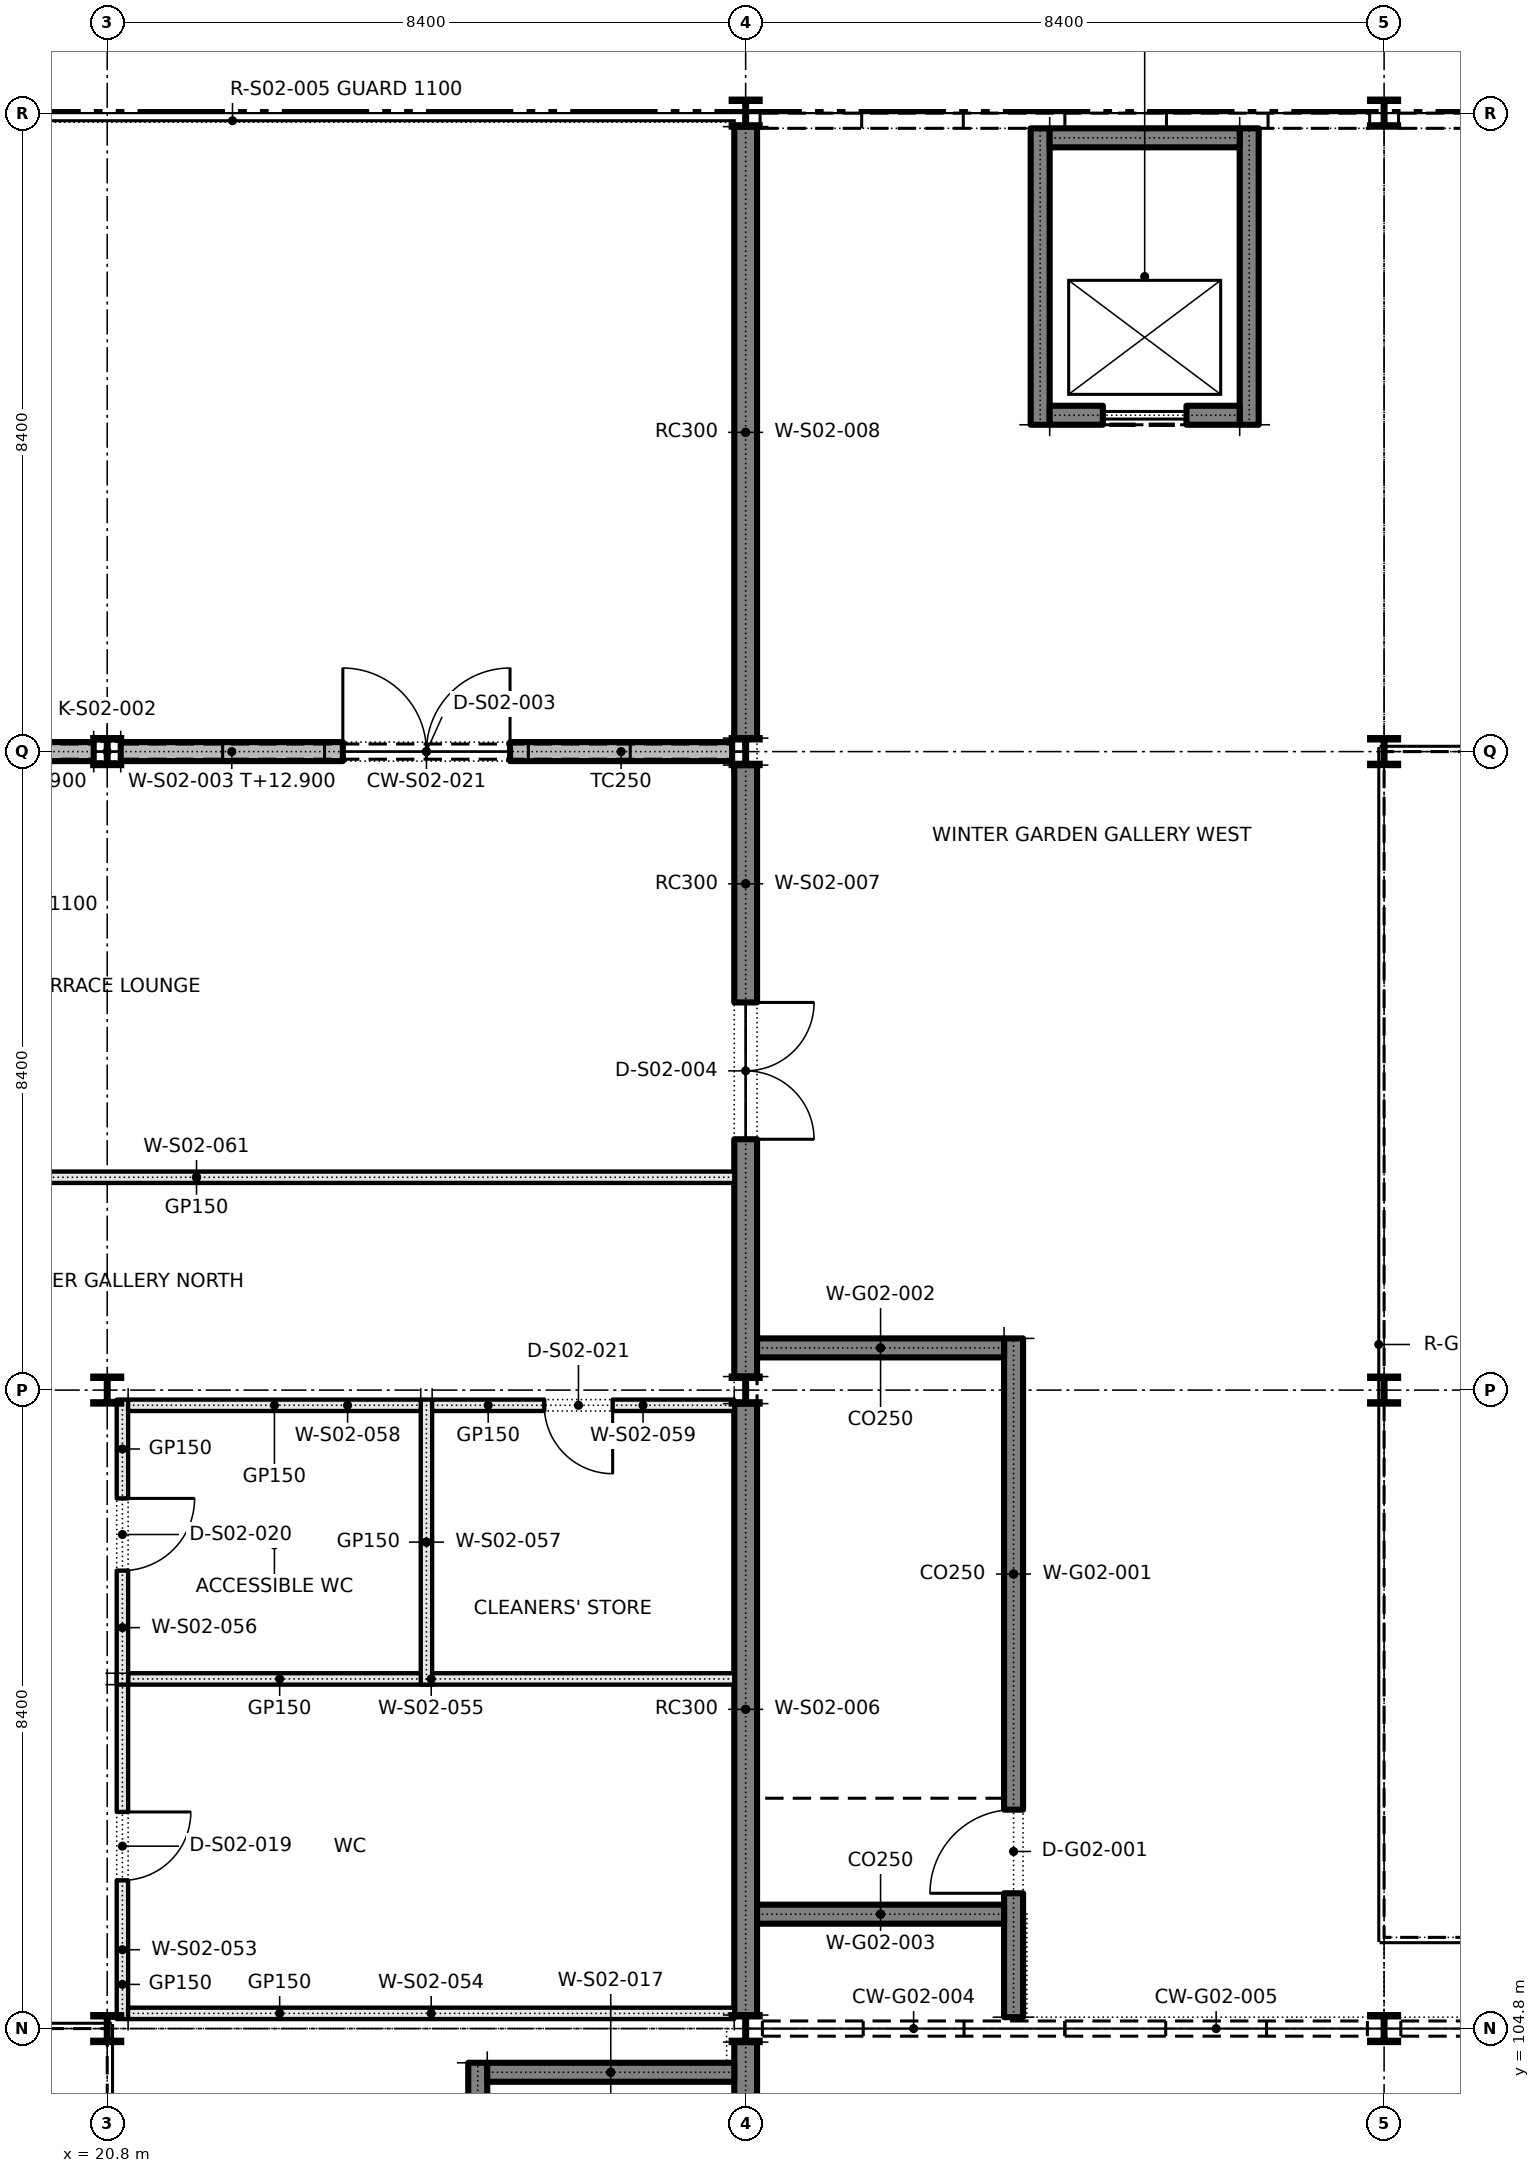
"""IFC4 building model, lengths in metres.
Left out: names, types, materials, properties, quantities, classifications, styles, units other than length and angle.
Written with IfcOpenShell. Run it as: python <this file> out.ifc"""

import sys

from ifc_helpers import new_model, si_unit, direction, frame, frame_2d, origin, origin_2d, place, context, subcontext, project, spatial, rectangle, i_section, extrude, element, fill, save


model = new_model("IFC4")
c1 = context("Model", 3, precision=1e-05, world=origin(), true_north=direction((0.0, 1.0)))
c2 = subcontext(c1, "Body", "Model", "MODEL_VIEW")
j1 = project(units=[si_unit("LENGTHUNIT", "METRE"), si_unit("PLANEANGLEUNIT", "RADIAN")], contexts=[c1])
p1 = place(None, origin())
s1 = spatial("IfcSite", under=j1, at=p1, CompositionType="ELEMENT")
p2 = place(p1, origin())
s2 = spatial("IfcBuilding", under=s1, at=p2, CompositionType="ELEMENT")
p3 = place(p2, frame((0.0, 0.0, 10.2)))
s3 = spatial("IfcBuildingStorey", under=s2, at=p3, CompositionType="ELEMENT", Elevation=10.2)
for number, where, z_axis, x_axis in (
    (1, (20.8, 104.8, 0.0), (0.0, 0.0, 1.0), (1.0, 0.0, 0.0)),
    (2, (20.8, 113.2, 0.0), (0.0, 0.0, 1.0), (1.0, 0.0, 0.0)),
    (3, (20.8, 121.6, 0.0), (0.0, 0.0, 1.0), (1.0, 0.0, 0.0)),
    (4, (29.2, 104.8, 0.0), (0.0, 0.0, 1.0), (1.0, 0.0, 0.0)),
    (5, (29.2, 113.2, 0.0), (0.0, 0.0, 1.0), (1.0, 0.0, 0.0)),
    (6, (29.2, 121.6, 0.0), (0.0, 0.0, 1.0), (1.0, 0.0, 0.0)),
    (7, (29.2, 130.0, 0.0), (0.0, 0.0, 1.0), (1.0, 0.0, 0.0)),
    (8, (37.6, 104.8, 0.0), (0.0, 0.0, 1.0), (1.0, 0.0, 0.0)),
    (9, (37.6, 113.2, 0.0), (0.0, 0.0, 1.0), (1.0, 0.0, 0.0)),
    (10, (37.6, 121.6, 0.0), (0.0, 0.0, 1.0), (1.0, 0.0, 0.0)),
    (11, (37.6, 130.0, 0.0), (0.0, 0.0, 1.0), (1.0, 0.0, 0.0)),
):
    element("IfcColumn", number, at=place(p3, frame(where, z_axis=z_axis, x_axis=x_axis)), inside=s3, PredefinedType="COLUMN", context=c2, shape_type="SweptSolid", body=[
        extrude(i_section(OverallWidth=0.368, OverallDepth=0.356, WebThickness=0.011, FlangeThickness=0.018, FilletRadius=0.015, at=origin_2d()), origin(), (0.0, 0.0, 1.0), 4.8),
    ])
p4 = place(p3, frame((12.578, 121.6, 0.0), z_axis=(0.0, 0.0, 1.0), x_axis=(1.0, 0.0, 0.0)))
e12 = element("IfcWall", 12, at=p4, inside=s3, PredefinedType="SOLIDWALL", context=c2, shape_type="SweptSolid", body=[
    extrude(rectangle(XDim=8.044, YDim=0.25, at=frame_2d((4.022, 0.0))), origin(), (0.0, 0.0, 1.0), 2.7),
])
p5 = place(p4, frame((2.922, 0.0, 0.0)))
e13 = element("IfcOpeningElement", 13, at=p5, cuts=e12, PredefinedType="OPENING", context=c2, shape_type="SweptSolid", body=[
    extrude(rectangle(XDim=2.2, YDim=2.4, at=frame_2d((1.1, 1.2))), frame((0.0, 0.135, 0.0), z_axis=(0.0, -1.0, 0.0), x_axis=(1.0, 0.0, 0.0)), (0.0, 0.0, 1.0), 0.27),
])
p6 = place(p3, frame((20.978, 121.6, 0.0), z_axis=(0.0, 0.0, 1.0), x_axis=(1.0, 0.0, 0.0)))
e14 = element("IfcWall", 14, at=p6, inside=s3, PredefinedType="SOLIDWALL", context=c2, shape_type="SweptSolid", body=[
    extrude(rectangle(XDim=8.044, YDim=0.25, at=frame_2d((4.022, 0.0))), origin(), (0.0, 0.0, 1.0), 2.7),
])
p7 = place(p6, frame((2.922, 0.0, 0.0)))
e15 = element("IfcOpeningElement", 15, at=p7, cuts=e14, PredefinedType="OPENING", context=c2, shape_type="SweptSolid", body=[
    extrude(rectangle(XDim=2.2, YDim=2.4, at=frame_2d((1.1, 1.2))), frame((0.0, 0.135, 0.0), z_axis=(0.0, -1.0, 0.0), x_axis=(1.0, 0.0, 0.0)), (0.0, 0.0, 1.0), 0.27),
])
p8 = place(p3, frame((29.2, 96.65, 0.0), z_axis=(0.0, 0.0, 1.0), x_axis=(0.0, 1.0, 0.0)))
e16 = element("IfcWall", 16, at=p8, inside=s3, PredefinedType="SOLIDWALL", context=c2, shape_type="SweptSolid", body=[
    extrude(rectangle(XDim=7.972, YDim=0.3, at=frame_2d((3.986, 0.0))), origin(), (0.0, 0.0, 1.0), 4.8),
])
p9 = place(p3, frame((29.2, 104.978, 0.0), z_axis=(0.0, 0.0, 1.0), x_axis=(0.0, 1.0, 0.0)))
e17 = element("IfcWall", 17, at=p9, inside=s3, PredefinedType="SOLIDWALL", context=c2, shape_type="SweptSolid", body=[
    extrude(rectangle(XDim=8.044, YDim=0.3, at=frame_2d((4.022, 0.0))), origin(), (0.0, 0.0, 1.0), 4.8),
])
p10 = place(p3, frame((29.2, 113.378, 0.0), z_axis=(0.0, 0.0, 1.0), x_axis=(0.0, 1.0, 0.0)))
e18 = element("IfcWall", 18, at=p10, inside=s3, PredefinedType="SOLIDWALL", context=c2, shape_type="SweptSolid", body=[
    extrude(rectangle(XDim=8.044, YDim=0.3, at=frame_2d((4.022, 0.0))), origin(), (0.0, 0.0, 1.0), 4.8),
])
p11 = place(p10, frame((3.122, 0.0, 0.0)))
e19 = element("IfcOpeningElement", 19, at=p11, cuts=e18, PredefinedType="OPENING", context=c2, shape_type="SweptSolid", body=[
    extrude(rectangle(XDim=1.8, YDim=2.4, at=frame_2d((0.9, 1.2))), frame((0.0, 0.16, 0.0), z_axis=(0.0, -1.0, 0.0), x_axis=(1.0, 0.0, 0.0)), (0.0, 0.0, 1.0), 0.32),
])
p12 = place(p3, frame((29.2, 121.778, 0.0), z_axis=(0.0, 0.0, 1.0), x_axis=(0.0, 1.0, 0.0)))
e20 = element("IfcWall", 20, at=p12, inside=s3, PredefinedType="SOLIDWALL", context=c2, shape_type="SweptSolid", body=[
    extrude(rectangle(XDim=8.044, YDim=0.3, at=frame_2d((4.022, 0.0))), origin(), (0.0, 0.0, 1.0), 4.8),
])
p13 = place(p3, frame((25.675, 96.65, 0.0), z_axis=(0.0, 0.0, 1.0), x_axis=(0.0, 1.0, 0.0)))
e21 = element("IfcWall", 21, at=p13, inside=s3, PredefinedType="SHEAR", context=c2, shape_type="SweptSolid", body=[
    extrude(rectangle(XDim=7.7, YDim=0.25, at=frame_2d((3.85, 0.0))), origin(), (0.0, 0.0, 1.0), 4.8),
])
p14 = place(p13, frame((0.4, 0.0, 0.0)))
e22 = element("IfcOpeningElement", 22, at=p14, cuts=e21, PredefinedType="OPENING", context=c2, shape_type="SweptSolid", body=[
    extrude(rectangle(XDim=1.1, YDim=2.1, at=frame_2d((0.55, 1.05))), frame((0.0, 0.135, 0.0), z_axis=(0.0, -1.0, 0.0), x_axis=(1.0, 0.0, 0.0)), (0.0, 0.0, 1.0), 0.27),
])
p15 = place(p3, frame((25.8, 104.225, 0.0), z_axis=(0.0, 0.0, 1.0), x_axis=(1.0, 0.0, 0.0)))
e23 = element("IfcWall", 23, at=p15, inside=s3, PredefinedType="SHEAR", context=c2, shape_type="SweptSolid", body=[
    extrude(rectangle(XDim=3.25, YDim=0.25, at=frame_2d((1.625, 0.0))), origin(), (0.0, 0.0, 1.0), 4.8),
])
p16 = place(p3, frame((21.0, 104.925, 0.0), z_axis=(0.0, 0.0, 1.0), x_axis=(0.0, 1.0, 0.0)))
e24 = element("IfcWall", 24, at=p16, inside=s3, PredefinedType="PARTITIONING", context=c2, shape_type="SweptSolid", body=[
    extrude(rectangle(XDim=4.55, YDim=0.15, at=frame_2d((2.275, 0.0))), origin(), (0.0, 0.0, 1.0), 4.8),
])
p17 = place(p16, frame((1.825, 0.0, 0.0)))
e25 = element("IfcOpeningElement", 25, at=p17, cuts=e24, PredefinedType="OPENING", context=c2, shape_type="SweptSolid", body=[
    extrude(rectangle(XDim=0.9, YDim=2.1, at=frame_2d((0.45, 1.05))), frame((0.0, 0.085, 0.0), z_axis=(0.0, -1.0, 0.0), x_axis=(1.0, 0.0, 0.0)), (0.0, 0.0, 1.0), 0.17),
])
for number, where, z_axis, x_axis in (
    (26, (21.075, 105.0, 0.0), (0.0, 0.0, 1.0), (1.0, 0.0, 0.0)),
    (27, (21.075, 109.4, 0.0), (0.0, 0.0, 1.0), (1.0, 0.0, 0.0)),
):
    element("IfcWall", number, at=place(p3, frame(where, z_axis=z_axis, x_axis=x_axis)), inside=s3, PredefinedType="PARTITIONING", context=c2, shape_type="SweptSolid", body=[
        extrude(rectangle(XDim=7.975, YDim=0.15, at=frame_2d((3.988, 0.0))), origin(), (0.0, 0.0, 1.0), 4.8),
    ])
p18 = place(p3, frame((21.0, 109.325, 0.0), z_axis=(0.0, 0.0, 1.0), x_axis=(0.0, 1.0, 0.0)))
e28 = element("IfcWall", 28, at=p18, inside=s3, PredefinedType="PARTITIONING", context=c2, shape_type="SweptSolid", body=[
    extrude(rectangle(XDim=3.75, YDim=0.15, at=frame_2d((1.875, 0.0))), origin(), (0.0, 0.0, 1.0), 4.8),
])
p19 = place(p18, frame((1.5, 0.0, 0.0)))
e29 = element("IfcOpeningElement", 29, at=p19, cuts=e28, PredefinedType="OPENING", context=c2, shape_type="SweptSolid", body=[
    extrude(rectangle(XDim=0.95, YDim=2.1, at=frame_2d((0.475, 1.05))), frame((0.0, 0.085, 0.0), z_axis=(0.0, -1.0, 0.0), x_axis=(1.0, 0.0, 0.0)), (0.0, 0.0, 1.0), 0.17),
])
p20 = place(p3, frame((25.0, 109.325, 0.0), z_axis=(0.0, 0.0, 1.0), x_axis=(0.0, 1.0, 0.0)))
e30 = element("IfcWall", 30, at=p20, inside=s3, PredefinedType="PARTITIONING", context=c2, shape_type="SweptSolid", body=[
    extrude(rectangle(XDim=3.75, YDim=0.15, at=frame_2d((1.875, 0.0))), origin(), (0.0, 0.0, 1.0), 4.8),
])
p21 = place(p3, frame((21.075, 113.0, 0.0), z_axis=(0.0, 0.0, 1.0), x_axis=(1.0, 0.0, 0.0)))
e31 = element("IfcWall", 31, at=p21, inside=s3, PredefinedType="PARTITIONING", context=c2, shape_type="SweptSolid", body=[
    extrude(rectangle(XDim=3.85, YDim=0.15, at=frame_2d((1.925, 0.0))), origin(), (0.0, 0.0, 1.0), 4.8),
])
p22 = place(p3, frame((25.075, 113.0, 0.0), z_axis=(0.0, 0.0, 1.0), x_axis=(1.0, 0.0, 0.0)))
e32 = element("IfcWall", 32, at=p22, inside=s3, PredefinedType="PARTITIONING", context=c2, shape_type="SweptSolid", body=[
    extrude(rectangle(XDim=3.975, YDim=0.15, at=frame_2d((1.988, 0.0))), origin(), (0.0, 0.0, 1.0), 4.8),
])
p23 = place(p22, frame((1.475, 0.0, 0.0)))
e33 = element("IfcOpeningElement", 33, at=p23, cuts=e32, PredefinedType="OPENING", context=c2, shape_type="SweptSolid", body=[
    extrude(rectangle(XDim=0.9, YDim=2.1, at=frame_2d((0.45, 1.05))), frame((0.0, 0.085, 0.0), z_axis=(0.0, -1.0, 0.0), x_axis=(1.0, 0.0, 0.0)), (0.0, 0.0, 1.0), 0.17),
])
p24 = place(p3, frame((9.775, 116.0, 0.0), z_axis=(0.0, 0.0, 1.0), x_axis=(1.0, 0.0, 0.0)))
e34 = element("IfcWall", 34, at=p24, inside=s3, PredefinedType="PARTITIONING", context=c2, shape_type="SweptSolid", body=[
    extrude(rectangle(XDim=19.275, YDim=0.15, at=frame_2d((9.638, 0.0))), origin(), (0.0, 0.0, 1.0), 4.8),
])
p25 = place(p24, frame((3.325, 0.0, 0.0)))
e35 = element("IfcOpeningElement", 35, at=p25, cuts=e34, PredefinedType="OPENING", context=c2, shape_type="SweptSolid", body=[
    extrude(rectangle(XDim=1.8, YDim=2.1, at=frame_2d((0.9, 1.05))), frame((0.0, 0.085, 0.0), z_axis=(0.0, -1.0, 0.0), x_axis=(1.0, 0.0, 0.0)), (0.0, 0.0, 1.0), 0.17),
])
p26 = place(p3, frame((32.725, 104.95, 0.0), z_axis=(0.0, 0.0, 1.0), x_axis=(0.0, 1.0, 0.0)))
e36 = element("IfcWall", 36, at=p26, inside=s3, PredefinedType="SHEAR", context=c2, shape_type="SweptSolid", body=[
    extrude(rectangle(XDim=8.93, YDim=0.25, at=frame_2d((4.465, 0.0))), origin(), (0.0, 0.0, 1.0), 4.8),
])
p27 = place(p26, frame((1.63, 0.0, 0.0)))
e37 = element("IfcOpeningElement", 37, at=p27, cuts=e36, PredefinedType="OPENING", context=c2, shape_type="SweptSolid", body=[
    extrude(rectangle(XDim=1.1, YDim=2.1, at=frame_2d((0.55, 1.05))), frame((0.0, 0.135, 0.0), z_axis=(0.0, -1.0, 0.0), x_axis=(1.0, 0.0, 0.0)), (0.0, 0.0, 1.0), 0.27),
])
for number, where, z_axis, x_axis in (
    (38, (29.35, 113.755, 0.0), (0.0, 0.0, 1.0), (1.0, 0.0, 0.0)),
    (39, (29.35, 106.305, 0.0), (0.0, 0.0, 1.0), (1.0, 0.0, 0.0)),
):
    element("IfcWall", number, at=place(p3, frame(where, z_axis=z_axis, x_axis=x_axis)), inside=s3, PredefinedType="SHEAR", context=c2, shape_type="SweptSolid", body=[
        extrude(rectangle(XDim=3.25, YDim=0.25, at=frame_2d((1.625, 0.0))), origin(), (0.0, 0.0, 1.0), 4.8),
    ])
for number, where, z_axis, x_axis in (
    (40, (33.075, 125.9, 0.0), (0.0, 0.0, 1.0), (0.0, 1.0, 0.0)),
    (41, (35.825, 125.9, 0.0), (0.0, 0.0, 1.0), (0.0, 1.0, 0.0)),
):
    element("IfcWall", number, at=place(p3, frame(where, z_axis=z_axis, x_axis=x_axis)), inside=s3, PredefinedType="SOLIDWALL", context=c2, shape_type="SweptSolid", body=[
        extrude(rectangle(XDim=3.9, YDim=0.25, at=frame_2d((1.95, 0.0))), origin(), (0.0, 0.0, 1.0), 3.9),
    ])
p28 = place(p3, frame((33.2, 126.025, 0.0), z_axis=(0.0, 0.0, 1.0), x_axis=(1.0, 0.0, 0.0)))
e42 = element("IfcWall", 42, at=p28, inside=s3, PredefinedType="SOLIDWALL", context=c2, shape_type="SweptSolid", body=[
    extrude(rectangle(XDim=2.5, YDim=0.25, at=frame_2d((1.25, 0.0))), origin(), (0.0, 0.0, 1.0), 3.9),
])
p29 = place(p28, frame((0.7, 0.0, 0.0)))
e43 = element("IfcOpeningElement", 43, at=p29, cuts=e42, PredefinedType="OPENING", context=c2, shape_type="SweptSolid", body=[
    extrude(rectangle(XDim=1.1, YDim=2.1, at=frame_2d((0.55, 1.05))), frame((0.0, 0.135, 0.0), z_axis=(0.0, -1.0, 0.0), x_axis=(1.0, 0.0, 0.0)), (0.0, 0.0, 1.0), 0.27),
])
p30 = place(p3, frame((33.2, 129.675, 0.0), z_axis=(0.0, 0.0, 1.0), x_axis=(1.0, 0.0, 0.0)))
e44 = element("IfcWall", 44, at=p30, inside=s3, PredefinedType="SOLIDWALL", context=c2, shape_type="SweptSolid", body=[
    extrude(rectangle(XDim=2.5, YDim=0.25, at=frame_2d((1.25, 0.0))), origin(), (0.0, 0.0, 1.0), 3.9),
])
p31 = place(p7, origin())
e45 = element("IfcDoor", 45, at=p31, inside=s3, OperationType="DOUBLE_DOOR_SINGLE_SWING", PredefinedType="DOOR", context=c2, shape_type="SweptSolid", body=[
    extrude(rectangle(XDim=2.2, YDim=2.4, at=frame_2d((1.1, 1.2))), frame((0.0, 0.025, 0.0), z_axis=(0.0, -1.0, 0.0), x_axis=(1.0, 0.0, 0.0)), (0.0, 0.0, 1.0), 0.05),
])
fill(e15, e45)
p32 = place(p11, frame((1.8, 0.0, 0.0), z_axis=(0.0, 0.0, 1.0), x_axis=(-1.0, 0.0, 0.0)))
e46 = element("IfcDoor", 46, at=p32, inside=s3, OperationType="DOUBLE_DOOR_SINGLE_SWING", PredefinedType="DOOR", context=c2, shape_type="SweptSolid", body=[
    extrude(rectangle(XDim=1.8, YDim=2.4, at=frame_2d((0.9, 1.2))), frame((0.0, 0.025, 0.0), z_axis=(0.0, -1.0, 0.0), x_axis=(1.0, 0.0, 0.0)), (0.0, 0.0, 1.0), 0.05),
])
fill(e19, e46)
p33 = place(p17, frame((0.9, 0.0, 0.0), z_axis=(0.0, 0.0, 1.0), x_axis=(-1.0, 0.0, 0.0)))
e47 = element("IfcDoor", 47, at=p33, inside=s3, OperationType="SINGLE_SWING_LEFT", PredefinedType="DOOR", context=c2, shape_type="SweptSolid", body=[
    extrude(rectangle(XDim=0.9, YDim=2.1, at=frame_2d((0.45, 1.05))), frame((0.0, 0.025, 0.0), z_axis=(0.0, -1.0, 0.0), x_axis=(1.0, 0.0, 0.0)), (0.0, 0.0, 1.0), 0.05),
])
fill(e25, e47)
p34 = place(p19, frame((0.95, 0.0, 0.0), z_axis=(0.0, 0.0, 1.0), x_axis=(-1.0, 0.0, 0.0)))
e48 = element("IfcDoor", 48, at=p34, inside=s3, OperationType="SINGLE_SWING_LEFT", PredefinedType="DOOR", context=c2, shape_type="SweptSolid", body=[
    extrude(rectangle(XDim=0.95, YDim=2.1, at=frame_2d((0.475, 1.05))), frame((0.0, 0.025, 0.0), z_axis=(0.0, -1.0, 0.0), x_axis=(1.0, 0.0, 0.0)), (0.0, 0.0, 1.0), 0.05),
])
fill(e29, e48)
p35 = place(p23, frame((0.9, 0.0, 0.0), z_axis=(0.0, 0.0, 1.0), x_axis=(-1.0, 0.0, 0.0)))
e49 = element("IfcDoor", 49, at=p35, inside=s3, OperationType="SINGLE_SWING_LEFT", PredefinedType="DOOR", context=c2, shape_type="SweptSolid", body=[
    extrude(rectangle(XDim=0.9, YDim=2.1, at=frame_2d((0.45, 1.05))), frame((0.0, 0.025, 0.0), z_axis=(0.0, -1.0, 0.0), x_axis=(1.0, 0.0, 0.0)), (0.0, 0.0, 1.0), 0.05),
])
fill(e33, e49)
p36 = place(p27, origin())
e50 = element("IfcDoor", 50, at=p36, inside=s3, OperationType="SINGLE_SWING_LEFT", PredefinedType="DOOR", context=c2, shape_type="SweptSolid", body=[
    extrude(rectangle(XDim=1.1, YDim=2.1, at=frame_2d((0.55, 1.05))), frame((0.0, 0.025, 0.0), z_axis=(0.0, -1.0, 0.0), x_axis=(1.0, 0.0, 0.0)), (0.0, 0.0, 1.0), 0.05),
])
fill(e37, e50)
p37 = place(p29, origin())
e51 = element("IfcDoor", 51, at=p37, inside=s3, OperationType="SLIDING_TO_LEFT", PredefinedType="DOOR", context=c2, shape_type="SweptSolid", body=[
    extrude(rectangle(XDim=1.1, YDim=2.1, at=frame_2d((0.55, 1.05))), frame((0.0, 0.025, 0.0), z_axis=(0.0, -1.0, 0.0), x_axis=(1.0, 0.0, 0.0)), (0.0, 0.0, 1.0), 0.05),
])
fill(e43, e51)
save(model, sys.argv[1])
